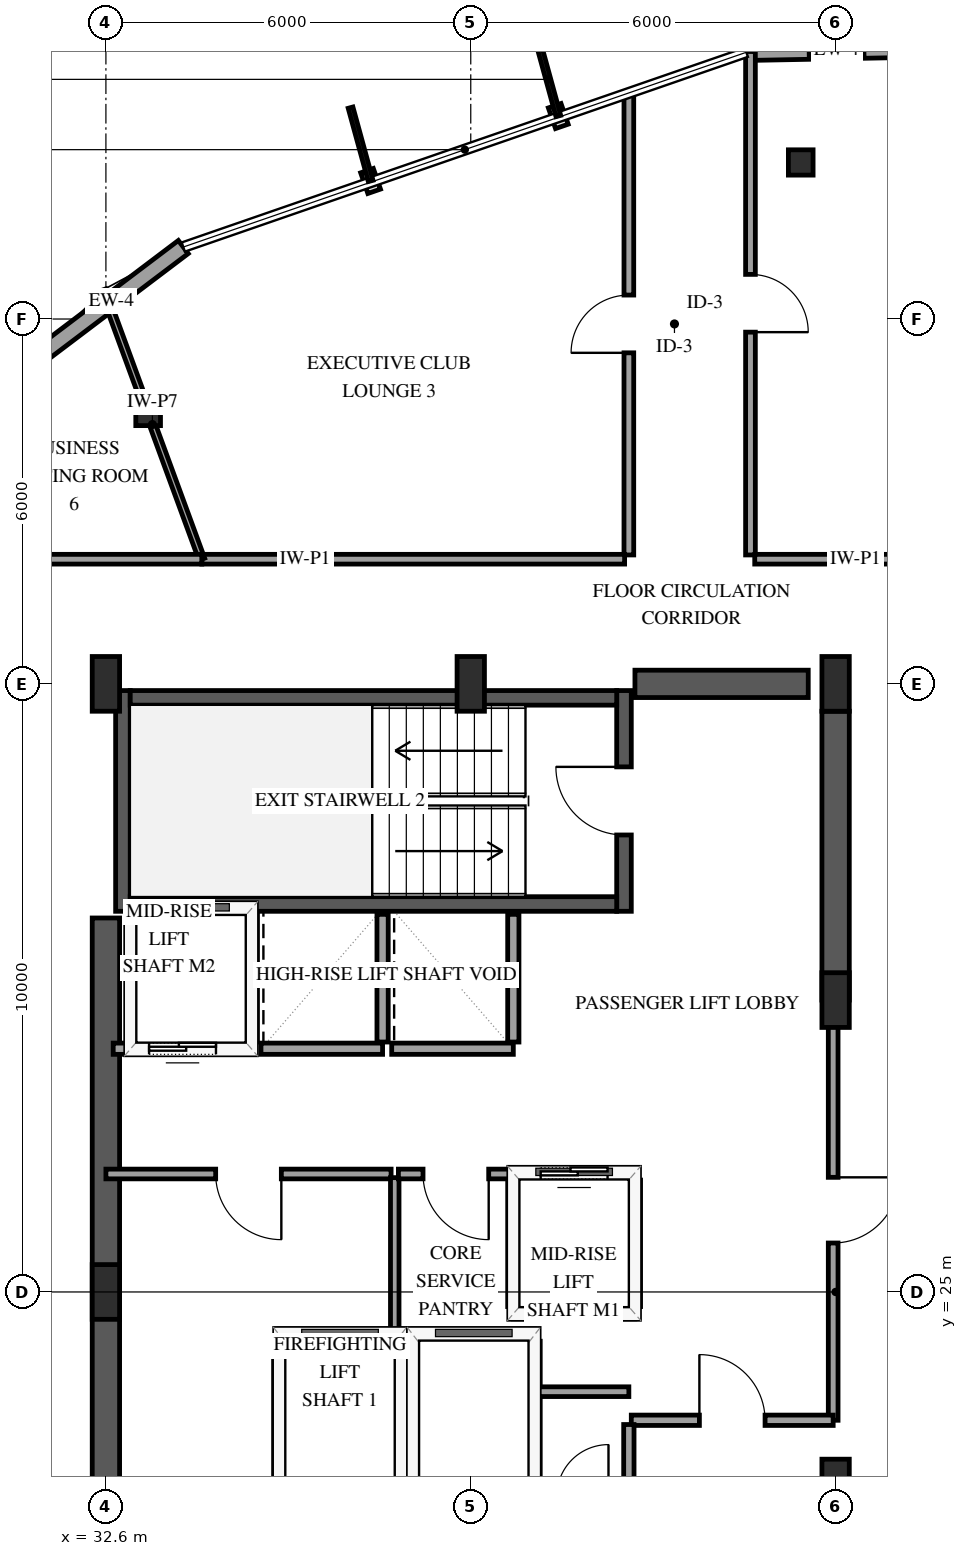
"""IFC4 building model, lengths in metres.
Left out: names, types, materials, properties, quantities, classifications, styles, units other than length and angle.
Written with IfcOpenShell. Run it as: python <this file> out.ifc"""

import sys

from ifc_helpers import new_model, si_unit, direction, frame, frame_2d, origin, origin_2d, place, context, subcontext, project, spatial, rectangle, i_section, extrude, element, fill, save


model = new_model("IFC4")
c1 = context("Model", 3, precision=1e-05, world=origin(), true_north=direction((0.0, 1.0)))
c2 = subcontext(c1, "Body", "Model", "MODEL_VIEW")
j1 = project(units=[si_unit("LENGTHUNIT", "METRE"), si_unit("PLANEANGLEUNIT", "RADIAN")], contexts=[c1])
p1 = place(None, origin())
s1 = spatial("IfcSite", under=j1, at=p1, CompositionType="ELEMENT")
p2 = place(p1, origin())
s2 = spatial("IfcBuilding", under=s1, at=p2, CompositionType="ELEMENT")
p3 = place(p2, frame((0.0, 0.0, 233.8)))
s3 = spatial("IfcBuildingStorey", under=s2, at=p3, CompositionType="ELEMENT", Elevation=233.8)
p4 = place(p3, frame((32.88, 31.26, 0.0), z_axis=(0.0, 0.0, 1.0), x_axis=(0.0, 1.0, 0.0)))
e1 = element("IfcWall", 1, at=p4, inside=s3, PredefinedType="SHEAR", context=c2, shape_type="SweptSolid", body=[
    extrude(rectangle(XDim=3.63, YDim=0.24, at=frame_2d((1.815, 0.0))), origin(), (0.0, 0.0, 1.0), 3.6),
])
p5 = place(p3, frame((41.12, 31.26, 0.0), z_axis=(0.0, 0.0, 1.0), x_axis=(0.0, 1.0, 0.0)))
e2 = element("IfcWall", 2, at=p5, inside=s3, PredefinedType="SHEAR", context=c2, shape_type="SweptSolid", body=[
    extrude(rectangle(XDim=3.63, YDim=0.24, at=frame_2d((1.815, 0.0))), origin(), (0.0, 0.0, 1.0), 3.6),
])
p6 = place(p5, frame((1.255, 0.0, 0.0)))
e3 = element("IfcOpeningElement", 3, at=p6, cuts=e2, PredefinedType="OPENING", context=c2, shape_type="SweptSolid", body=[
    extrude(rectangle(XDim=1.12, YDim=2.15, at=frame_2d((0.56, 1.075))), frame((0.0, 0.13, 0.0), z_axis=(0.0, -1.0, 0.0), x_axis=(1.0, 0.0, 0.0)), (0.0, 0.0, 1.0), 0.26),
])
for number, where, z_axis, x_axis in (
    (4, (33.0, 31.38, 0.0), (0.0, 0.0, 1.0), (1.0, 0.0, 0.0)),
    (5, (33.0, 34.77, 0.0), (0.0, 0.0, 1.0), (1.0, 0.0, 0.0)),
):
    element("IfcWall", number, at=place(p3, frame(where, z_axis=z_axis, x_axis=x_axis)), inside=s3, PredefinedType="SHEAR", context=c2, shape_type="SweptSolid", body=[
        extrude(rectangle(XDim=8.0, YDim=0.24, at=frame_2d((4.0, 0.0))), origin(), (0.0, 0.0, 1.0), 3.6),
    ])
p7 = place(p3, frame((32.6, 18.85, 0.0), z_axis=(0.0, 0.0, 1.0), x_axis=(0.0, 1.0, 0.0)))
e6 = element("IfcWall", 6, at=p7, inside=s3, PredefinedType="SHEAR", context=c2, shape_type="SweptSolid", body=[
    extrude(rectangle(XDim=12.3, YDim=0.45, at=frame_2d((6.15, 0.0))), origin(), (0.0, 0.0, 1.0), 3.6),
])
p8 = place(p3, frame((41.3, 35.0, 0.0), z_axis=(0.0, 0.0, 1.0), x_axis=(1.0, 0.0, 0.0)))
e7 = element("IfcWall", 7, at=p8, inside=s3, PredefinedType="SHEAR", context=c2, shape_type="SweptSolid", body=[
    extrude(rectangle(XDim=2.85, YDim=0.45, at=frame_2d((1.425, 0.0))), origin(), (0.0, 0.0, 1.0), 3.6),
])
p9 = place(p3, frame((44.6, 29.8, 0.0), z_axis=(0.0, 0.0, 1.0), x_axis=(0.0, 1.0, 0.0)))
e8 = element("IfcWall", 8, at=p9, inside=s3, PredefinedType="SHEAR", context=c2, shape_type="SweptSolid", body=[
    extrude(rectangle(XDim=4.75, YDim=0.45, at=frame_2d((2.375, 0.0))), origin(), (0.0, 0.0, 1.0), 3.6),
])
for number, where, z_axis, x_axis in (
    (9, (32.6, 25.0, 0.0), (0.0, 0.0, 1.0), (1.0, 0.0, 0.0)),
    (10, (32.6, 35.0, 0.0), (0.0, 0.0, 1.0), (1.0, 0.0, 0.0)),
    (11, (38.6, 35.0, 0.0), (0.0, 0.0, 1.0), (1.0, 0.0, 0.0)),
    (12, (44.6, 21.8, 0.0), (0.0, 0.0, 1.0), (1.0, 0.0, 0.0)),
    (13, (44.6, 29.8, 0.0), (0.0, 0.0, 1.0), (1.0, 0.0, 0.0)),
    (14, (44.6, 35.0, 0.0), (0.0, 0.0, 1.0), (1.0, 0.0, 0.0)),
):
    element("IfcColumn", number, at=place(p3, frame(where, z_axis=z_axis, x_axis=x_axis)), inside=s3, PredefinedType="PILASTER", context=c2, shape_type="SweptSolid", body=[
        extrude(rectangle(XDim=0.45, YDim=0.9, at=origin_2d()), origin(), (0.0, 0.0, 1.0), 3.6),
    ])
for number, where, z_axis, x_axis in (
    (15, (44.027, 43.574, 0.0), (0.0, 0.0, 1.0), (1.0, 0.0, 0.0)),
    (16, (33.295, 39.455, 0.0), (0.0, 0.0, 1.0), (1.0, 0.0, 0.0)),
):
    element("IfcColumn", number, at=place(p3, frame(where, z_axis=z_axis, x_axis=x_axis)), inside=s3, PredefinedType="COLUMN", context=c2, shape_type="SweptSolid", body=[
        extrude(i_section(OverallWidth=0.406, OverallDepth=0.416, WebThickness=0.03, FlangeThickness=0.048, FilletRadius=0.038, at=origin_2d()), origin(), (0.0, 0.0, 1.0), 3.6),
    ])
p10 = place(p3, frame((46.098, 45.442, 0.0), z_axis=(0.0, 0.0, 1.0), x_axis=(-0.999822399495, -0.018845940364, 0.0)))
e17 = element("IfcWall", 17, at=p10, inside=s3, PredefinedType="SOLIDWALL", context=c2, shape_type="SweptSolid", body=[
    extrude(rectangle(XDim=2.967, YDim=0.27, at=frame_2d((1.483, 0.0))), origin(), (0.0, 0.0, 1.0), 2.599),
])
p11 = place(p10, frame((1.033, 0.0, 0.75)))
e18 = element("IfcOpeningElement", 18, at=p11, cuts=e17, PredefinedType="OPENING", context=c2, shape_type="SweptSolid", body=[
    extrude(rectangle(XDim=0.9, YDim=1.5, at=frame_2d((0.45, 0.75))), frame((0.0, 0.145, 0.0), z_axis=(0.0, -1.0, 0.0), x_axis=(1.0, 0.0, 0.0)), (0.0, 0.0, 1.0), 0.29),
])
p12 = place(p3, frame((33.873, 42.184, 0.0), z_axis=(0.0, 0.0, 1.0), x_axis=(-0.797802225535, -0.602919239145, 0.0)))
e19 = element("IfcWall", 19, at=p12, inside=s3, PredefinedType="SOLIDWALL", context=c2, shape_type="SweptSolid", body=[
    extrude(rectangle(XDim=2.967, YDim=0.27, at=frame_2d((1.483, 0.0))), origin(), (0.0, 0.0, 1.0), 2.599),
])
p13 = place(p3, frame((35.45, 24.3, 0.0), z_axis=(0.0, 0.0, 1.0), x_axis=(1.0, 0.0, 0.0)))
e20 = element("IfcWall", 20, at=p13, inside=s3, PredefinedType="SOLIDWALL", context=c2, shape_type="SweptSolid", body=[
    extrude(rectangle(XDim=2.0, YDim=0.185, at=frame_2d((1.0, 0.0))), origin(), (0.0, 0.0, 1.0), 3.26),
])
for number, where, z_axis, x_axis in (
    (21, (35.45, 21.81, 0.0), (0.0, 0.0, 1.0), (0.0, 1.0, 0.0)),
    (22, (37.45, 21.81, 0.0), (0.0, 0.0, 1.0), (0.0, 1.0, 0.0)),
):
    element("IfcWall", number, at=place(p3, frame(where, z_axis=z_axis, x_axis=x_axis)), inside=s3, PredefinedType="SOLIDWALL", context=c2, shape_type="SweptSolid", body=[
        extrude(rectangle(XDim=2.38, YDim=0.185, at=frame_2d((1.19, 0.0))), origin(), (0.0, 0.0, 1.0), 3.26),
    ])
p14 = place(p3, frame((37.65, 24.3, 0.0), z_axis=(0.0, 0.0, 1.0), x_axis=(1.0, 0.0, 0.0)))
e23 = element("IfcWall", 23, at=p14, inside=s3, PredefinedType="SOLIDWALL", context=c2, shape_type="SweptSolid", body=[
    extrude(rectangle(XDim=2.0, YDim=0.185, at=frame_2d((1.0, 0.0))), origin(), (0.0, 0.0, 1.0), 3.26),
])
p15 = place(p3, frame((39.65, 21.81, 0.0), z_axis=(0.0, 0.0, 1.0), x_axis=(0.0, 1.0, 0.0)))
e24 = element("IfcWall", 24, at=p15, inside=s3, PredefinedType="SOLIDWALL", context=c2, shape_type="SweptSolid", body=[
    extrude(rectangle(XDim=2.38, YDim=0.185, at=frame_2d((1.19, 0.0))), origin(), (0.0, 0.0, 1.0), 3.26),
])
p16 = place(p3, frame((39.3, 24.65, 0.0), z_axis=(0.0, 0.0, 1.0), x_axis=(1.0, 0.0, 0.0)))
e25 = element("IfcWall", 25, at=p16, inside=s3, PredefinedType="SOLIDWALL", context=c2, shape_type="SweptSolid", body=[
    extrude(rectangle(XDim=2.0, YDim=0.185, at=frame_2d((1.0, 0.0))), origin(), (0.0, 0.0, 1.0), 3.26),
])
p17 = place(p3, frame((39.3, 26.95, 0.0), z_axis=(0.0, 0.0, 1.0), x_axis=(1.0, 0.0, 0.0)))
e26 = element("IfcWall", 26, at=p17, inside=s3, PredefinedType="SOLIDWALL", context=c2, shape_type="SweptSolid", body=[
    extrude(rectangle(XDim=2.0, YDim=0.185, at=frame_2d((1.0, 0.0))), origin(), (0.0, 0.0, 1.0), 3.26),
])
p18 = place(p17, frame((0.45, 0.0, 0.0)))
e27 = element("IfcOpeningElement", 27, at=p18, cuts=e26, PredefinedType="OPENING", context=c2, shape_type="SweptSolid", body=[
    extrude(rectangle(XDim=1.1, YDim=2.15, at=frame_2d((0.55, 1.075))), frame((0.0, 0.103, 0.0), z_axis=(0.0, -1.0, 0.0), x_axis=(1.0, 0.0, 0.0)), (0.0, 0.0, 1.0), 0.205),
])
for number, where, z_axis, x_axis in (
    (28, (39.3, 24.76, 0.0), (0.0, 0.0, 1.0), (0.0, 1.0, 0.0)),
    (29, (41.3, 24.76, 0.0), (0.0, 0.0, 1.0), (0.0, 1.0, 0.0)),
):
    element("IfcWall", number, at=place(p3, frame(where, z_axis=z_axis, x_axis=x_axis)), inside=s3, PredefinedType="SOLIDWALL", context=c2, shape_type="SweptSolid", body=[
        extrude(rectangle(XDim=2.08, YDim=0.185, at=frame_2d((1.04, 0.0))), origin(), (0.0, 0.0, 1.0), 3.26),
    ])
p19 = place(p3, frame((32.72, 29.0, 0.0), z_axis=(0.0, 0.0, 1.0), x_axis=(1.0, 0.0, 0.0)))
e30 = element("IfcWall", 30, at=p19, inside=s3, PredefinedType="SOLIDWALL", context=c2, shape_type="SweptSolid", body=[
    extrude(rectangle(XDim=2.28, YDim=0.185, at=frame_2d((1.14, 0.0))), origin(), (0.0, 0.0, 1.0), 3.26),
])
p20 = place(p19, frame((0.59, 0.0, 0.0)))
e31 = element("IfcOpeningElement", 31, at=p20, cuts=e30, PredefinedType="OPENING", context=c2, shape_type="SweptSolid", body=[
    extrude(rectangle(XDim=1.1, YDim=2.15, at=frame_2d((0.55, 1.075))), frame((0.0, 0.103, 0.0), z_axis=(0.0, -1.0, 0.0), x_axis=(1.0, 0.0, 0.0)), (0.0, 0.0, 1.0), 0.205),
])
p21 = place(p3, frame((35.0, 29.11, 0.0), z_axis=(0.0, 0.0, 1.0), x_axis=(0.0, 1.0, 0.0)))
e32 = element("IfcWall", 32, at=p21, inside=s3, PredefinedType="SOLIDWALL", context=c2, shape_type="SweptSolid", body=[
    extrude(rectangle(XDim=2.1, YDim=0.185, at=frame_2d((1.05, 0.0))), origin(), (0.0, 0.0, 1.0), 3.26),
])
p22 = place(p3, frame((35.15, 29.0, 0.0), z_axis=(0.0, 0.0, 1.0), x_axis=(1.0, 0.0, 0.0)))
e33 = element("IfcWall", 33, at=p22, inside=s3, PredefinedType="SOLIDWALL", context=c2, shape_type="SweptSolid", body=[
    extrude(rectangle(XDim=2.0, YDim=0.185, at=frame_2d((1.0, 0.0))), origin(), (0.0, 0.0, 1.0), 3.26),
])
p23 = place(p3, frame((37.15, 29.11, 0.0), z_axis=(0.0, 0.0, 1.0), x_axis=(0.0, 1.0, 0.0)))
e34 = element("IfcWall", 34, at=p23, inside=s3, PredefinedType="SOLIDWALL", context=c2, shape_type="SweptSolid", body=[
    extrude(rectangle(XDim=2.1, YDim=0.185, at=frame_2d((1.05, 0.0))), origin(), (0.0, 0.0, 1.0), 3.26),
])
p24 = place(p3, frame((37.3, 29.0, 0.0), z_axis=(0.0, 0.0, 1.0), x_axis=(1.0, 0.0, 0.0)))
e35 = element("IfcWall", 35, at=p24, inside=s3, PredefinedType="SOLIDWALL", context=c2, shape_type="SweptSolid", body=[
    extrude(rectangle(XDim=2.0, YDim=0.185, at=frame_2d((1.0, 0.0))), origin(), (0.0, 0.0, 1.0), 3.26),
])
p25 = place(p3, frame((39.3, 29.11, 0.0), z_axis=(0.0, 0.0, 1.0), x_axis=(0.0, 1.0, 0.0)))
e36 = element("IfcWall", 36, at=p25, inside=s3, PredefinedType="SOLIDWALL", context=c2, shape_type="SweptSolid", body=[
    extrude(rectangle(XDim=2.1, YDim=0.185, at=frame_2d((1.05, 0.0))), origin(), (0.0, 0.0, 1.0), 3.26),
])
p26 = place(p3, frame((43.2, 45.399, 0.0), z_axis=(0.0, 0.0, 1.0), x_axis=(0.0, -1.0, 0.0)))
e37 = element("IfcWall", 37, at=p26, inside=s3, PredefinedType="PARTITIONING", context=c2, shape_type="SweptSolid", body=[
    extrude(rectangle(XDim=8.279, YDim=0.16, at=frame_2d((4.139, 0.0))), origin(), (0.0, 0.0, 1.0), 2.515),
])
p27 = place(p26, frame((3.665, 0.0, 0.0)))
e38 = element("IfcOpeningElement", 38, at=p27, cuts=e37, PredefinedType="OPENING", context=c2, shape_type="SweptSolid", body=[
    extrude(rectangle(XDim=0.95, YDim=2.15, at=frame_2d((0.475, 1.075))), frame((0.0, 0.09, 0.0), z_axis=(0.0, -1.0, 0.0), x_axis=(1.0, 0.0, 0.0)), (0.0, 0.0, 1.0), 0.18),
])
p28 = place(p3, frame((41.2, 37.12, 0.0), z_axis=(0.0, 0.0, 1.0), x_axis=(0.0, 1.0, 0.0)))
e39 = element("IfcWall", 39, at=p28, inside=s3, PredefinedType="PARTITIONING", context=c2, shape_type="SweptSolid", body=[
    extrude(rectangle(XDim=7.598, YDim=0.16, at=frame_2d((3.799, 0.0))), origin(), (0.0, 0.0, 1.0), 3.26),
])
p29 = place(p28, frame((3.324, 0.0, 0.0)))
e40 = element("IfcOpeningElement", 40, at=p29, cuts=e39, PredefinedType="OPENING", context=c2, shape_type="SweptSolid", body=[
    extrude(rectangle(XDim=0.95, YDim=2.15, at=frame_2d((0.475, 1.075))), frame((0.0, 0.09, 0.0), z_axis=(0.0, -1.0, 0.0), x_axis=(1.0, 0.0, 0.0)), (0.0, 0.0, 1.0), 0.18),
])
p30 = place(p3, frame((34.177, 37.05, 0.0), z_axis=(0.0, 0.0, 1.0), x_axis=(1.0, 0.0, 0.0)))
e41 = element("IfcWall", 41, at=p30, inside=s3, PredefinedType="PARTITIONING", context=c2, shape_type="SweptSolid", body=[
    extrude(rectangle(XDim=6.953, YDim=0.16, at=frame_2d((3.477, 0.0))), origin(), (0.0, 0.0, 1.0), 3.26),
])
p31 = place(p3, frame((44.56, 29.8, 0.0), z_axis=(0.0, 0.0, 1.0), x_axis=(0.0, -1.0, 0.0)))
e42 = element("IfcWall", 42, at=p31, inside=s3, PredefinedType="PARTITIONING", context=c2, shape_type="SweptSolid", body=[
    extrude(rectangle(XDim=6.91, YDim=0.16, at=frame_2d((3.455, 0.0))), origin(), (0.0, 0.0, 1.0), 2.26),
])
p32 = place(p31, frame((2.915, 0.0, 0.0)))
e43 = element("IfcOpeningElement", 43, at=p32, cuts=e42, PredefinedType="OPENING", context=c2, shape_type="SweptSolid", body=[
    extrude(rectangle(XDim=1.08, YDim=2.15, at=frame_2d((0.54, 1.075))), frame((0.0, 0.09, 0.0), z_axis=(0.0, -1.0, 0.0), x_axis=(1.0, 0.0, 0.0)), (0.0, 0.0, 1.0), 0.18),
])
p33 = place(p3, frame((34.177, 37.05, 0.0), z_axis=(0.0, 0.0, 1.0), x_axis=(-0.344450796519, 0.938804371942, 0.0)))
e44 = element("IfcWall", 44, at=p33, inside=s3, PredefinedType="PARTITIONING", context=c2, shape_type="SweptSolid", body=[
    extrude(rectangle(XDim=4.718, YDim=0.1, at=frame_2d((2.359, 0.0))), origin(), (0.0, 0.0, 1.0), 2.515),
])
p34 = place(p3, frame((37.29, 26.94, 0.0), z_axis=(0.0, 0.0, 1.0), x_axis=(-1.0, 0.0, 0.0)))
e45 = element("IfcWall", 45, at=p34, inside=s3, PredefinedType="PARTITIONING", context=c2, shape_type="SweptSolid", body=[
    extrude(rectangle(XDim=4.69, YDim=0.16, at=frame_2d((2.345, 0.0))), origin(), (0.0, 0.0, 1.0), 3.26),
])
p35 = place(p34, frame((1.805, 0.0, 0.0)))
e46 = element("IfcOpeningElement", 46, at=p35, cuts=e45, PredefinedType="OPENING", context=c2, shape_type="SweptSolid", body=[
    extrude(rectangle(XDim=1.08, YDim=2.15, at=frame_2d((0.54, 1.075))), frame((0.0, 0.09, 0.0), z_axis=(0.0, -1.0, 0.0), x_axis=(1.0, 0.0, 0.0)), (0.0, 0.0, 1.0), 0.18),
])
p36 = place(p3, frame((30.62, 37.05, 0.0), z_axis=(0.0, 0.0, 1.0), x_axis=(1.0, 0.0, 0.0)))
e47 = element("IfcWall", 47, at=p36, inside=s3, PredefinedType="PARTITIONING", context=c2, shape_type="SweptSolid", body=[
    extrude(rectangle(XDim=3.557, YDim=0.16, at=frame_2d((1.778, 0.0))), origin(), (0.0, 0.0, 1.0), 3.26),
])
p37 = place(p3, frame((41.24, 22.89, 0.0), z_axis=(0.0, 0.0, 1.0), x_axis=(1.0, 0.0, 0.0)))
e48 = element("IfcWall", 48, at=p37, inside=s3, PredefinedType="PARTITIONING", context=c2, shape_type="SweptSolid", body=[
    extrude(rectangle(XDim=3.32, YDim=0.17, at=frame_2d((1.66, 0.0))), origin(), (0.0, 0.0, 1.0), 3.26),
])
p38 = place(p37, frame((1.12, 0.0, 0.0)))
e49 = element("IfcOpeningElement", 49, at=p38, cuts=e48, PredefinedType="OPENING", context=c2, shape_type="SweptSolid", body=[
    extrude(rectangle(XDim=1.08, YDim=2.15, at=frame_2d((0.54, 1.075))), frame((0.0, 0.095, 0.0), z_axis=(0.0, -1.0, 0.0), x_axis=(1.0, 0.0, 0.0)), (0.0, 0.0, 1.0), 0.19),
])
p39 = place(p3, frame((43.27, 37.05, 0.0), z_axis=(0.0, 0.0, 1.0), x_axis=(1.0, 0.0, 0.0)))
e50 = element("IfcWall", 50, at=p39, inside=s3, PredefinedType="PARTITIONING", context=c2, shape_type="SweptSolid", body=[
    extrude(rectangle(XDim=3.31, YDim=0.16, at=frame_2d((1.655, 0.0))), origin(), (0.0, 0.0, 1.0), 3.26),
])
p40 = place(p3, frame((37.35, 26.88, 0.0), z_axis=(0.0, 0.0, 1.0), x_axis=(0.0, -1.0, 0.0)))
e51 = element("IfcWall", 51, at=p40, inside=s3, PredefinedType="PARTITIONING", context=c2, shape_type="SweptSolid", body=[
    extrude(rectangle(XDim=2.58, YDim=0.14, at=frame_2d((1.29, 0.0))), origin(), (0.0, 0.0, 1.0), 3.26),
])
p41 = place(p3, frame((39.3, 26.94, 0.0), z_axis=(0.0, 0.0, 1.0), x_axis=(-1.0, 0.0, 0.0)))
e52 = element("IfcWall", 52, at=p41, inside=s3, PredefinedType="PARTITIONING", context=c2, shape_type="SweptSolid", body=[
    extrude(rectangle(XDim=1.89, YDim=0.16, at=frame_2d((0.945, 0.0))), origin(), (0.0, 0.0, 1.0), 3.26),
])
p42 = place(p41, frame((0.405, 0.0, 0.0)))
e53 = element("IfcOpeningElement", 53, at=p42, cuts=e52, PredefinedType="OPENING", context=c2, shape_type="SweptSolid", body=[
    extrude(rectangle(XDim=1.08, YDim=2.15, at=frame_2d((0.54, 1.075))), frame((0.0, 0.09, 0.0), z_axis=(0.0, -1.0, 0.0), x_axis=(1.0, 0.0, 0.0)), (0.0, 0.0, 1.0), 0.18),
])
p43 = place(p3, frame((41.2, 21.7, 0.0), z_axis=(0.0, 0.0, 1.0), x_axis=(0.0, 1.0, 0.0)))
e54 = element("IfcWall", 54, at=p43, inside=s3, PredefinedType="PARTITIONING", context=c2, shape_type="SweptSolid", body=[
    extrude(rectangle(XDim=1.12, YDim=0.17, at=frame_2d((0.56, 0.0))), origin(), (0.0, 0.0, 1.0), 3.26),
])
p44 = place(p3, frame((41.2, 23.36, 0.0), z_axis=(0.0, 0.0, 1.0), x_axis=(-1.0, 0.0, 0.0)))
e55 = element("IfcWall", 55, at=p44, inside=s3, PredefinedType="PARTITIONING", context=c2, shape_type="SweptSolid", body=[
    extrude(rectangle(XDim=1.48, YDim=0.16, at=frame_2d((0.74, 0.0))), origin(), (0.0, 0.0, 1.0), 3.26),
])
p45 = place(p11, origin())
e56 = element("IfcWindow", 56, at=p45, inside=s3, PartitioningType="SINGLE_PANEL", PredefinedType="WINDOW", context=c2, shape_type="SweptSolid", body=[
    extrude(rectangle(XDim=0.9, YDim=1.5, at=frame_2d((0.45, 0.75))), frame((0.0, 0.03, 0.0), z_axis=(0.0, -1.0, 0.0), x_axis=(1.0, 0.0, 0.0)), (0.0, 0.0, 1.0), 0.06),
])
fill(e18, e56)
p46 = place(p18, origin())
e57 = element("IfcDoor", 57, at=p46, inside=s3, OperationType="SLIDING_TO_LEFT", PredefinedType="DOOR", context=c2, shape_type="SweptSolid", body=[
    extrude(rectangle(XDim=1.1, YDim=2.15, at=frame_2d((0.55, 1.075))), frame((0.0, 0.025, 0.0), z_axis=(0.0, -1.0, 0.0), x_axis=(1.0, 0.0, 0.0)), (0.0, 0.0, 1.0), 0.05),
])
fill(e27, e57)
p47 = place(p20, origin())
e58 = element("IfcDoor", 58, at=p47, inside=s3, OperationType="SLIDING_TO_LEFT", PredefinedType="DOOR", context=c2, shape_type="SweptSolid", body=[
    extrude(rectangle(XDim=1.1, YDim=2.15, at=frame_2d((0.55, 1.075))), frame((0.0, 0.025, 0.0), z_axis=(0.0, -1.0, 0.0), x_axis=(1.0, 0.0, 0.0)), (0.0, 0.0, 1.0), 0.05),
])
fill(e31, e58)
p48 = place(p6, origin())
e59 = element("IfcDoor", 59, at=p48, inside=s3, OperationType="SINGLE_SWING_RIGHT", PredefinedType="DOOR", context=c2, shape_type="SweptSolid", body=[
    extrude(rectangle(XDim=1.12, YDim=2.15, at=frame_2d((0.56, 1.075))), frame((0.0, 0.025, 0.0), z_axis=(0.0, -1.0, 0.0), x_axis=(1.0, 0.0, 0.0)), (0.0, 0.0, 1.0), 0.05),
])
fill(e3, e59)
p49 = place(p27, origin())
e60 = element("IfcDoor", 60, at=p49, inside=s3, OperationType="SINGLE_SWING_RIGHT", PredefinedType="DOOR", context=c2, shape_type="SweptSolid", body=[
    extrude(rectangle(XDim=0.95, YDim=2.15, at=frame_2d((0.475, 1.075))), frame((0.0, 0.025, 0.0), z_axis=(0.0, -1.0, 0.0), x_axis=(1.0, 0.0, 0.0)), (0.0, 0.0, 1.0), 0.05),
])
fill(e38, e60)
p50 = place(p29, origin())
e61 = element("IfcDoor", 61, at=p50, inside=s3, OperationType="SINGLE_SWING_LEFT", PredefinedType="DOOR", context=c2, shape_type="SweptSolid", body=[
    extrude(rectangle(XDim=0.95, YDim=2.15, at=frame_2d((0.475, 1.075))), frame((0.0, 0.025, 0.0), z_axis=(0.0, -1.0, 0.0), x_axis=(1.0, 0.0, 0.0)), (0.0, 0.0, 1.0), 0.05),
])
fill(e40, e61)
p51 = place(p32, origin())
e62 = element("IfcDoor", 62, at=p51, inside=s3, OperationType="SINGLE_SWING_LEFT", PredefinedType="DOOR", context=c2, shape_type="SweptSolid", body=[
    extrude(rectangle(XDim=1.08, YDim=2.15, at=frame_2d((0.54, 1.075))), frame((0.0, 0.025, 0.0), z_axis=(0.0, -1.0, 0.0), x_axis=(1.0, 0.0, 0.0)), (0.0, 0.0, 1.0), 0.05),
])
fill(e43, e62)
p52 = place(p35, origin())
e63 = element("IfcDoor", 63, at=p52, inside=s3, OperationType="SINGLE_SWING_LEFT", PredefinedType="DOOR", context=c2, shape_type="SweptSolid", body=[
    extrude(rectangle(XDim=1.08, YDim=2.15, at=frame_2d((0.54, 1.075))), frame((0.0, 0.025, 0.0), z_axis=(0.0, -1.0, 0.0), x_axis=(1.0, 0.0, 0.0)), (0.0, 0.0, 1.0), 0.05),
])
fill(e46, e63)
p53 = place(p38, origin())
e64 = element("IfcDoor", 64, at=p53, inside=s3, OperationType="SINGLE_SWING_LEFT", PredefinedType="DOOR", context=c2, shape_type="SweptSolid", body=[
    extrude(rectangle(XDim=1.08, YDim=2.15, at=frame_2d((0.54, 1.075))), frame((0.0, 0.025, 0.0), z_axis=(0.0, -1.0, 0.0), x_axis=(1.0, 0.0, 0.0)), (0.0, 0.0, 1.0), 0.05),
])
fill(e49, e64)
p54 = place(p42, origin())
e65 = element("IfcDoor", 65, at=p54, inside=s3, OperationType="SINGLE_SWING_LEFT", PredefinedType="DOOR", context=c2, shape_type="SweptSolid", body=[
    extrude(rectangle(XDim=1.08, YDim=2.15, at=frame_2d((0.54, 1.075))), frame((0.0, 0.025, 0.0), z_axis=(0.0, -1.0, 0.0), x_axis=(1.0, 0.0, 0.0)), (0.0, 0.0, 1.0), 0.05),
])
fill(e53, e65)
save(model, sys.argv[1])
